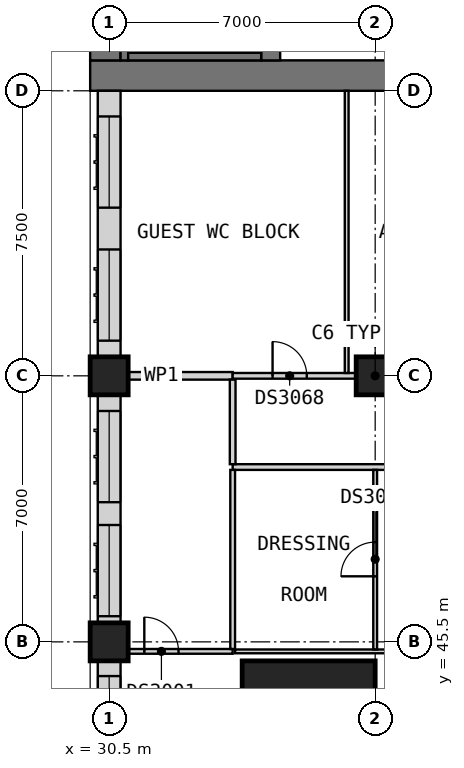
"""IFC4 building model, lengths in metres.
Left out: names, types, materials, properties, quantities, classifications, styles, units other than length and angle.
Written with IfcOpenShell. Run it as: python <this file> out.ifc"""

import sys

from ifc_helpers import new_model, si_unit, direction, frame, frame_2d, origin, origin_2d, place, context, subcontext, project, spatial, rectangle, extrude, element, fill, save


model = new_model("IFC4")
c1 = context("Model", 3, precision=1e-05, world=origin(), true_north=direction((0.0, 1.0)))
c2 = subcontext(c1, "Body", "Model", "MODEL_VIEW")
j1 = project(units=[si_unit("LENGTHUNIT", "METRE"), si_unit("PLANEANGLEUNIT", "RADIAN")], contexts=[c1])
p1 = place(None, origin())
s1 = spatial("IfcSite", under=j1, at=p1, CompositionType="ELEMENT")
p2 = place(p1, origin())
s2 = spatial("IfcBuilding", under=s1, at=p2, CompositionType="ELEMENT")
p3 = place(p2, frame((0.0, 0.0, 137.4)))
s3 = spatial("IfcBuildingStorey", under=s2, at=p3, CompositionType="ELEMENT", Elevation=137.4)
for number, where, z_axis, x_axis in (
    (1, (30.5, 45.5, 0.0), (0.0, 0.0, 1.0), (1.0, 0.0, 0.0)),
    (2, (30.5, 52.5, 0.0), (0.0, 0.0, 1.0), (1.0, 0.0, 0.0)),
    (3, (37.5, 52.5, 0.0), (0.0, 0.0, 1.0), (1.0, 0.0, 0.0)),
):
    element("IfcColumn", number, at=place(p3, frame(where, z_axis=z_axis, x_axis=x_axis)), inside=s3, PredefinedType="COLUMN", context=c2, shape_type="SweptSolid", body=[
        extrude(rectangle(XDim=1.0, YDim=1.0, at=origin_2d()), origin(), (0.0, 0.0, 1.0), 3.6),
    ])
p4 = place(p3, frame((35.75, 43.25, 0.0), z_axis=(0.0, 0.0, 1.0), x_axis=(1.0, 0.0, 0.0)))
e4 = element("IfcColumn", 4, at=p4, inside=s3, PredefinedType="COLUMN", context=c2, shape_type="SweptSolid", body=[
    extrude(rectangle(XDim=3.5, YDim=3.5, at=origin_2d()), origin(), (0.0, 0.0, 1.0), 3.6),
])
p5 = place(p3, frame((30.0, 60.4, 0.0), z_axis=(0.0, 0.0, 1.0), x_axis=(1.0, 0.0, 0.0)))
e5 = element("IfcWall", 5, at=p5, inside=s3, PredefinedType="SHEAR", context=c2, shape_type="SweptSolid", body=[
    extrude(rectangle(XDim=30.0, YDim=0.8, at=frame_2d((15.0, 0.0))), origin(), (0.0, 0.0, 1.0), 3.6),
])
p6 = place(p5, frame((21.9, 0.0, 0.0)))
e6 = element("IfcOpeningElement", 6, at=p6, cuts=e5, PredefinedType="OPENING", context=c2, shape_type="SweptSolid", body=[
    extrude(rectangle(XDim=1.8, YDim=2.1, at=frame_2d((0.9, 1.05))), frame((0.0, 0.41, 0.0), z_axis=(0.0, -1.0, 0.0), x_axis=(1.0, 0.0, 0.0)), (0.0, 0.0, 1.0), 0.82),
])
p7 = place(p5, frame((26.5, 0.0, 0.0)))
e7 = element("IfcOpeningElement", 7, at=p7, cuts=e5, PredefinedType="OPENING", context=c2, shape_type="SweptSolid", body=[
    extrude(rectangle(XDim=1.2, YDim=2.1, at=frame_2d((0.6, 1.05))), frame((0.0, 0.41, 0.0), z_axis=(0.0, -1.0, 0.0), x_axis=(1.0, 0.0, 0.0)), (0.0, 0.0, 1.0), 0.82),
])
p8 = place(p3, frame((30.4, 60.8, 0.0), z_axis=(0.0, 0.0, 1.0), x_axis=(0.0, 1.0, 0.0)))
e8 = element("IfcWall", 8, at=p8, inside=s3, PredefinedType="SHEAR", context=c2, shape_type="SweptSolid", body=[
    extrude(rectangle(XDim=20.9, YDim=0.8, at=frame_2d((10.45, 0.0))), origin(), (0.0, 0.0, 1.0), 3.6),
])
p9 = place(p3, frame((34.75, 60.8, 0.0), z_axis=(0.0, 0.0, 1.0), x_axis=(0.0, 1.0, 0.0)))
e9 = element("IfcWall", 9, at=p9, inside=s3, PredefinedType="SHEAR", context=c2, shape_type="SweptSolid", body=[
    extrude(rectangle(XDim=3.4, YDim=0.5, at=frame_2d((1.7, 0.0))), origin(), (0.0, 0.0, 1.0), 3.6),
])
p10 = place(p3, frame((30.5, 60.0, 0.0), z_axis=(0.0, 0.0, 1.0), x_axis=(0.0, -1.0, 0.0)))
e10 = element("IfcWall", 10, at=p10, inside=s3, PredefinedType="SOLIDWALL", context=c2, shape_type="SweptSolid", body=[
    extrude(rectangle(XDim=7.0, YDim=0.6, at=frame_2d((3.5, 0.0))), origin(), (0.0, 0.0, 1.0), 3.35),
])
p11 = place(p10, frame((4.175, 0.0, 0.8)))
e11 = element("IfcOpeningElement", 11, at=p11, cuts=e10, PredefinedType="OPENING", context=c2, shape_type="SweptSolid", body=[
    extrude(rectangle(XDim=2.4, YDim=1.8, at=frame_2d((1.2, 0.9))), frame((0.0, 0.31, 0.0), z_axis=(0.0, -1.0, 0.0), x_axis=(1.0, 0.0, 0.0)), (0.0, 0.0, 1.0), 0.62),
])
p12 = place(p10, frame((0.675, 0.0, 0.8)))
e12 = element("IfcOpeningElement", 12, at=p12, cuts=e10, PredefinedType="OPENING", context=c2, shape_type="SweptSolid", body=[
    extrude(rectangle(XDim=2.4, YDim=1.8, at=frame_2d((1.2, 0.9))), frame((0.0, 0.31, 0.0), z_axis=(0.0, -1.0, 0.0), x_axis=(1.0, 0.0, 0.0)), (0.0, 0.0, 1.0), 0.62),
])
p13 = place(p3, frame((30.5, 52.0, 0.0), z_axis=(0.0, 0.0, 1.0), x_axis=(0.0, -1.0, 0.0)))
e13 = element("IfcWall", 13, at=p13, inside=s3, PredefinedType="SOLIDWALL", context=c2, shape_type="SweptSolid", body=[
    extrude(rectangle(XDim=6.0, YDim=0.6, at=frame_2d((3.0, 0.0))), origin(), (0.0, 0.0, 1.0), 2.85),
])
p14 = place(p13, frame((3.425, 0.0, 0.8)))
e14 = element("IfcOpeningElement", 14, at=p14, cuts=e13, PredefinedType="OPENING", context=c2, shape_type="SweptSolid", body=[
    extrude(rectangle(XDim=2.4, YDim=1.8, at=frame_2d((1.2, 0.9))), frame((0.0, 0.31, 0.0), z_axis=(0.0, -1.0, 0.0), x_axis=(1.0, 0.0, 0.0)), (0.0, 0.0, 1.0), 0.62),
])
p15 = place(p13, frame((0.425, 0.0, 0.8)))
e15 = element("IfcOpeningElement", 15, at=p15, cuts=e13, PredefinedType="OPENING", context=c2, shape_type="SweptSolid", body=[
    extrude(rectangle(XDim=2.4, YDim=1.8, at=frame_2d((1.2, 0.9))), frame((0.0, 0.31, 0.0), z_axis=(0.0, -1.0, 0.0), x_axis=(1.0, 0.0, 0.0)), (0.0, 0.0, 1.0), 0.62),
])
p16 = place(p3, frame((30.5, 45.0, 0.0), z_axis=(0.0, 0.0, 1.0), x_axis=(0.0, -1.0, 0.0)))
e16 = element("IfcWall", 16, at=p16, inside=s3, PredefinedType="SOLIDWALL", context=c2, shape_type="SweptSolid", body=[
    extrude(rectangle(XDim=3.5, YDim=0.6, at=frame_2d((1.75, 0.0))), origin(), (0.0, 0.0, 1.0), 3.35),
])
p17 = place(p16, frame((0.4, 0.0, 0.8)))
e17 = element("IfcOpeningElement", 17, at=p17, cuts=e16, PredefinedType="OPENING", context=c2, shape_type="SweptSolid", body=[
    extrude(rectangle(XDim=1.8, YDim=1.8, at=frame_2d((0.9, 0.9))), frame((0.0, 0.31, 0.0), z_axis=(0.0, -1.0, 0.0), x_axis=(1.0, 0.0, 0.0)), (0.0, 0.0, 1.0), 0.62),
])
p18 = place(p3, frame((30.9, 60.8, 0.0), z_axis=(0.0, 0.0, 1.0), x_axis=(0.0, 1.0, 0.0)))
e18 = element("IfcWall", 18, at=p18, inside=s3, PredefinedType="SOLIDWALL", context=c2, shape_type="SweptSolid", body=[
    extrude(rectangle(XDim=20.9, YDim=0.2, at=frame_2d((10.45, 0.0))), origin(), (0.0, 0.0, 1.0), 3.35),
])
p19 = place(p3, frame((31.0, 60.9, 0.0), z_axis=(0.0, 0.0, 1.0), x_axis=(1.0, 0.0, 0.0)))
e19 = element("IfcWall", 19, at=p19, inside=s3, PredefinedType="SOLIDWALL", context=c2, shape_type="SweptSolid", body=[
    extrude(rectangle(XDim=3.5, YDim=0.2, at=frame_2d((1.75, 0.0))), origin(), (0.0, 0.0, 1.0), 3.35),
])
p20 = place(p3, frame((30.0, 52.5, 0.0), z_axis=(0.0, 0.0, 1.0), x_axis=(1.0, 0.0, 0.0)))
e20 = element("IfcWall", 20, at=p20, inside=s3, PredefinedType="PARTITIONING", context=c2, shape_type="SweptSolid", body=[
    extrude(rectangle(XDim=3.75, YDim=0.2, at=frame_2d((1.875, 0.0))), origin(), (0.0, 0.0, 1.0), 3.35),
])
p21 = place(p3, frame((33.75, 50.1, 0.0), z_axis=(0.0, 0.0, 1.0), x_axis=(1.0, 0.0, 0.0)))
e21 = element("IfcWall", 21, at=p21, inside=s3, PredefinedType="PARTITIONING", context=c2, shape_type="SweptSolid", body=[
    extrude(rectangle(XDim=39.9, YDim=0.15, at=frame_2d((19.95, 0.0))), origin(), (0.0, 0.0, 1.0), 3.35),
])
p22 = place(p21, frame((5.175, 0.0, 0.0)))
e22 = element("IfcOpeningElement", 22, at=p22, cuts=e21, PredefinedType="OPENING", context=c2, shape_type="SweptSolid", body=[
    extrude(rectangle(XDim=0.9, YDim=2.1, at=frame_2d((0.45, 1.05))), frame((0.0, 0.085, 0.0), z_axis=(0.0, -1.0, 0.0), x_axis=(1.0, 0.0, 0.0)), (0.0, 0.0, 1.0), 0.17),
])
p23 = place(p21, frame((9.3, 0.0, 0.0)))
e23 = element("IfcOpeningElement", 23, at=p23, cuts=e21, PredefinedType="OPENING", context=c2, shape_type="SweptSolid", body=[
    extrude(rectangle(XDim=0.9, YDim=2.1, at=frame_2d((0.45, 1.05))), frame((0.0, 0.085, 0.0), z_axis=(0.0, -1.0, 0.0), x_axis=(1.0, 0.0, 0.0)), (0.0, 0.0, 1.0), 0.17),
])
p24 = place(p21, frame((20.55, 0.0, 0.0)))
e24 = element("IfcOpeningElement", 24, at=p24, cuts=e21, PredefinedType="OPENING", context=c2, shape_type="SweptSolid", body=[
    extrude(rectangle(XDim=0.9, YDim=2.1, at=frame_2d((0.45, 1.05))), frame((0.0, 0.085, 0.0), z_axis=(0.0, -1.0, 0.0), x_axis=(1.0, 0.0, 0.0)), (0.0, 0.0, 1.0), 0.17),
])
p25 = place(p21, frame((35.55, 0.0, 0.0)))
e25 = element("IfcOpeningElement", 25, at=p25, cuts=e21, PredefinedType="OPENING", context=c2, shape_type="SweptSolid", body=[
    extrude(rectangle(XDim=0.9, YDim=2.1, at=frame_2d((0.45, 1.05))), frame((0.0, 0.085, 0.0), z_axis=(0.0, -1.0, 0.0), x_axis=(1.0, 0.0, 0.0)), (0.0, 0.0, 1.0), 0.17),
])
p26 = place(p21, frame((38.25, 0.0, 0.0)))
e26 = element("IfcOpeningElement", 26, at=p26, cuts=e21, PredefinedType="OPENING", context=c2, shape_type="SweptSolid", body=[
    extrude(rectangle(XDim=0.9, YDim=2.1, at=frame_2d((0.45, 1.05))), frame((0.0, 0.085, 0.0), z_axis=(0.0, -1.0, 0.0), x_axis=(1.0, 0.0, 0.0)), (0.0, 0.0, 1.0), 0.17),
])
p27 = place(p3, frame((33.75, 52.5, 0.0), z_axis=(0.0, 0.0, 1.0), x_axis=(1.0, 0.0, 0.0)))
e27 = element("IfcWall", 27, at=p27, inside=s3, PredefinedType="PARTITIONING", context=c2, shape_type="SweptSolid", body=[
    extrude(rectangle(XDim=17.15, YDim=0.15, at=frame_2d((8.575, 0.0))), origin(), (0.0, 0.0, 1.0), 3.35),
])
p28 = place(p27, frame((1.05, 0.0, 0.0)))
e28 = element("IfcOpeningElement", 28, at=p28, cuts=e27, PredefinedType="OPENING", context=c2, shape_type="SweptSolid", body=[
    extrude(rectangle(XDim=0.9, YDim=2.1, at=frame_2d((0.45, 1.05))), frame((0.0, 0.085, 0.0), z_axis=(0.0, -1.0, 0.0), x_axis=(1.0, 0.0, 0.0)), (0.0, 0.0, 1.0), 0.17),
])
p29 = place(p27, frame((6.3, 0.0, 0.0)))
e29 = element("IfcOpeningElement", 29, at=p29, cuts=e27, PredefinedType="OPENING", context=c2, shape_type="SweptSolid", body=[
    extrude(rectangle(XDim=0.9, YDim=2.1, at=frame_2d((0.45, 1.05))), frame((0.0, 0.085, 0.0), z_axis=(0.0, -1.0, 0.0), x_axis=(1.0, 0.0, 0.0)), (0.0, 0.0, 1.0), 0.17),
])
p30 = place(p27, frame((12.3, 0.0, 0.0)))
e30 = element("IfcOpeningElement", 30, at=p30, cuts=e27, PredefinedType="OPENING", context=c2, shape_type="SweptSolid", body=[
    extrude(rectangle(XDim=0.9, YDim=2.1, at=frame_2d((0.45, 1.05))), frame((0.0, 0.085, 0.0), z_axis=(0.0, -1.0, 0.0), x_axis=(1.0, 0.0, 0.0)), (0.0, 0.0, 1.0), 0.17),
])
p31 = place(p27, frame((15.625, 0.0, 0.0)))
e31 = element("IfcOpeningElement", 31, at=p31, cuts=e27, PredefinedType="OPENING", context=c2, shape_type="SweptSolid", body=[
    extrude(rectangle(XDim=0.9, YDim=2.1, at=frame_2d((0.45, 1.05))), frame((0.0, 0.085, 0.0), z_axis=(0.0, -1.0, 0.0), x_axis=(1.0, 0.0, 0.0)), (0.0, 0.0, 1.0), 0.17),
])
p32 = place(p3, frame((33.75, 50.175, 0.0), z_axis=(0.0, 0.0, 1.0), x_axis=(0.0, 1.0, 0.0)))
e32 = element("IfcWall", 32, at=p32, inside=s3, PredefinedType="PARTITIONING", context=c2, shape_type="SweptSolid", body=[
    extrude(rectangle(XDim=2.225, YDim=0.15, at=frame_2d((1.112, 0.0))), origin(), (0.0, 0.0, 1.0), 3.35),
])
p33 = place(p3, frame((33.812, 45.25, 0.0), z_axis=(0.0, 0.0, 1.0), x_axis=(1.0, 0.0, 0.0)))
e33 = element("IfcWall", 33, at=p33, inside=s3, PredefinedType="PARTITIONING", context=c2, shape_type="SweptSolid", body=[
    extrude(rectangle(XDim=11.875, YDim=0.1, at=frame_2d((5.938, 0.0))), origin(), (0.0, 0.0, 1.0), 3.35),
])
p34 = place(p33, frame((5.113, 0.0, 0.0)))
e34 = element("IfcOpeningElement", 34, at=p34, cuts=e33, PredefinedType="OPENING", context=c2, shape_type="SweptSolid", body=[
    extrude(rectangle(XDim=0.9, YDim=2.1, at=frame_2d((0.45, 1.05))), frame((0.0, 0.06, 0.0), z_axis=(0.0, -1.0, 0.0), x_axis=(1.0, 0.0, 0.0)), (0.0, 0.0, 1.0), 0.12),
])
p35 = place(p33, frame((9.238, 0.0, 0.0)))
e35 = element("IfcOpeningElement", 35, at=p35, cuts=e33, PredefinedType="OPENING", context=c2, shape_type="SweptSolid", body=[
    extrude(rectangle(XDim=0.9, YDim=2.1, at=frame_2d((0.45, 1.05))), frame((0.0, 0.06, 0.0), z_axis=(0.0, -1.0, 0.0), x_axis=(1.0, 0.0, 0.0)), (0.0, 0.0, 1.0), 0.12),
])
p36 = place(p3, frame((36.75, 52.575, 0.0), z_axis=(0.0, 0.0, 1.0), x_axis=(0.0, 1.0, 0.0)))
e36 = element("IfcWall", 36, at=p36, inside=s3, PredefinedType="PARTITIONING", context=c2, shape_type="SweptSolid", body=[
    extrude(rectangle(XDim=7.425, YDim=0.1, at=frame_2d((3.712, 0.0))), origin(), (0.0, 0.0, 1.0), 3.35),
])
p37 = place(p3, frame((37.5, 45.3, 0.0), z_axis=(0.0, 0.0, 1.0), x_axis=(0.0, 1.0, 0.0)))
e37 = element("IfcWall", 37, at=p37, inside=s3, PredefinedType="PARTITIONING", context=c2, shape_type="SweptSolid", body=[
    extrude(rectangle(XDim=4.725, YDim=0.1, at=frame_2d((2.362, 0.0))), origin(), (0.0, 0.0, 1.0), 3.35),
])
p38 = place(p37, frame((1.925, 0.0, 0.0)))
e38 = element("IfcOpeningElement", 38, at=p38, cuts=e37, PredefinedType="OPENING", context=c2, shape_type="SweptSolid", body=[
    extrude(rectangle(XDim=0.9, YDim=2.1, at=frame_2d((0.45, 1.05))), frame((0.0, 0.06, 0.0), z_axis=(0.0, -1.0, 0.0), x_axis=(1.0, 0.0, 0.0)), (0.0, 0.0, 1.0), 0.12),
])
p39 = place(p3, frame((30.0, 45.25, 0.0), z_axis=(0.0, 0.0, 1.0), x_axis=(1.0, 0.0, 0.0)))
e39 = element("IfcWall", 39, at=p39, inside=s3, PredefinedType="PARTITIONING", context=c2, shape_type="SweptSolid", body=[
    extrude(rectangle(XDim=3.75, YDim=0.125, at=frame_2d((1.875, 0.0))), origin(), (0.0, 0.0, 1.0), 3.35),
])
p40 = place(p39, frame((1.425, 0.0, 0.0)))
e40 = element("IfcOpeningElement", 40, at=p40, cuts=e39, PredefinedType="OPENING", context=c2, shape_type="SweptSolid", body=[
    extrude(rectangle(XDim=0.9, YDim=2.1, at=frame_2d((0.45, 1.05))), frame((0.0, 0.073, 0.0), z_axis=(0.0, -1.0, 0.0), x_axis=(1.0, 0.0, 0.0)), (0.0, 0.0, 1.0), 0.145),
])
p41 = place(p3, frame((33.75, 45.312, 0.0), z_axis=(0.0, 0.0, 1.0), x_axis=(0.0, 1.0, 0.0)))
e41 = element("IfcWall", 41, at=p41, inside=s3, PredefinedType="PARTITIONING", context=c2, shape_type="SweptSolid", body=[
    extrude(rectangle(XDim=4.712, YDim=0.125, at=frame_2d((2.356, 0.0))), origin(), (0.0, 0.0, 1.0), 3.35),
])
p42 = place(p11, origin())
e42 = element("IfcWindow", 42, at=p42, inside=s3, PartitioningType="SINGLE_PANEL", PredefinedType="WINDOW", context=c2, shape_type="SweptSolid", body=[
    extrude(rectangle(XDim=2.4, YDim=1.8, at=frame_2d((1.2, 0.9))), frame((0.0, -0.07, 0.0), z_axis=(0.0, -1.0, 0.0), x_axis=(1.0, 0.0, 0.0)), (0.0, 0.0, 1.0), 0.06),
])
fill(e11, e42)
p43 = place(p12, origin())
e43 = element("IfcWindow", 43, at=p43, inside=s3, PartitioningType="SINGLE_PANEL", PredefinedType="WINDOW", context=c2, shape_type="SweptSolid", body=[
    extrude(rectangle(XDim=2.4, YDim=1.8, at=frame_2d((1.2, 0.9))), frame((0.0, -0.07, 0.0), z_axis=(0.0, -1.0, 0.0), x_axis=(1.0, 0.0, 0.0)), (0.0, 0.0, 1.0), 0.06),
])
fill(e12, e43)
p44 = place(p14, origin())
e44 = element("IfcWindow", 44, at=p44, inside=s3, PartitioningType="SINGLE_PANEL", PredefinedType="WINDOW", context=c2, shape_type="SweptSolid", body=[
    extrude(rectangle(XDim=2.4, YDim=1.8, at=frame_2d((1.2, 0.9))), frame((0.0, -0.07, 0.0), z_axis=(0.0, -1.0, 0.0), x_axis=(1.0, 0.0, 0.0)), (0.0, 0.0, 1.0), 0.06),
])
fill(e14, e44)
p45 = place(p15, origin())
e45 = element("IfcWindow", 45, at=p45, inside=s3, PartitioningType="SINGLE_PANEL", PredefinedType="WINDOW", context=c2, shape_type="SweptSolid", body=[
    extrude(rectangle(XDim=2.4, YDim=1.8, at=frame_2d((1.2, 0.9))), frame((0.0, -0.07, 0.0), z_axis=(0.0, -1.0, 0.0), x_axis=(1.0, 0.0, 0.0)), (0.0, 0.0, 1.0), 0.06),
])
fill(e15, e45)
p46 = place(p17, origin())
e46 = element("IfcWindow", 46, at=p46, inside=s3, PartitioningType="SINGLE_PANEL", PredefinedType="WINDOW", context=c2, shape_type="SweptSolid", body=[
    extrude(rectangle(XDim=1.8, YDim=1.8, at=frame_2d((0.9, 0.9))), frame((0.0, -0.07, 0.0), z_axis=(0.0, -1.0, 0.0), x_axis=(1.0, 0.0, 0.0)), (0.0, 0.0, 1.0), 0.06),
])
fill(e17, e46)
p47 = place(p40, origin())
e47 = element("IfcDoor", 47, at=p47, inside=s3, OperationType="SINGLE_SWING_LEFT", PredefinedType="DOOR", context=c2, shape_type="SweptSolid", body=[
    extrude(rectangle(XDim=0.9, YDim=2.1, at=frame_2d((0.45, 1.05))), frame((0.0, 0.025, 0.0), z_axis=(0.0, -1.0, 0.0), x_axis=(1.0, 0.0, 0.0)), (0.0, 0.0, 1.0), 0.05),
])
fill(e40, e47)
p48 = place(p38, origin())
e48 = element("IfcDoor", 48, at=p48, inside=s3, OperationType="SINGLE_SWING_RIGHT", PredefinedType="DOOR", context=c2, shape_type="SweptSolid", body=[
    extrude(rectangle(XDim=0.9, YDim=2.1, at=frame_2d((0.45, 1.05))), frame((0.0, 0.025, 0.0), z_axis=(0.0, -1.0, 0.0), x_axis=(1.0, 0.0, 0.0)), (0.0, 0.0, 1.0), 0.05),
])
fill(e38, e48)
p49 = place(p28, origin())
e49 = element("IfcDoor", 49, at=p49, inside=s3, OperationType="SINGLE_SWING_LEFT", PredefinedType="DOOR", context=c2, shape_type="SweptSolid", body=[
    extrude(rectangle(XDim=0.9, YDim=2.1, at=frame_2d((0.45, 1.05))), frame((0.0, 0.025, 0.0), z_axis=(0.0, -1.0, 0.0), x_axis=(1.0, 0.0, 0.0)), (0.0, 0.0, 1.0), 0.05),
])
fill(e28, e49)
save(model, sys.argv[1])
